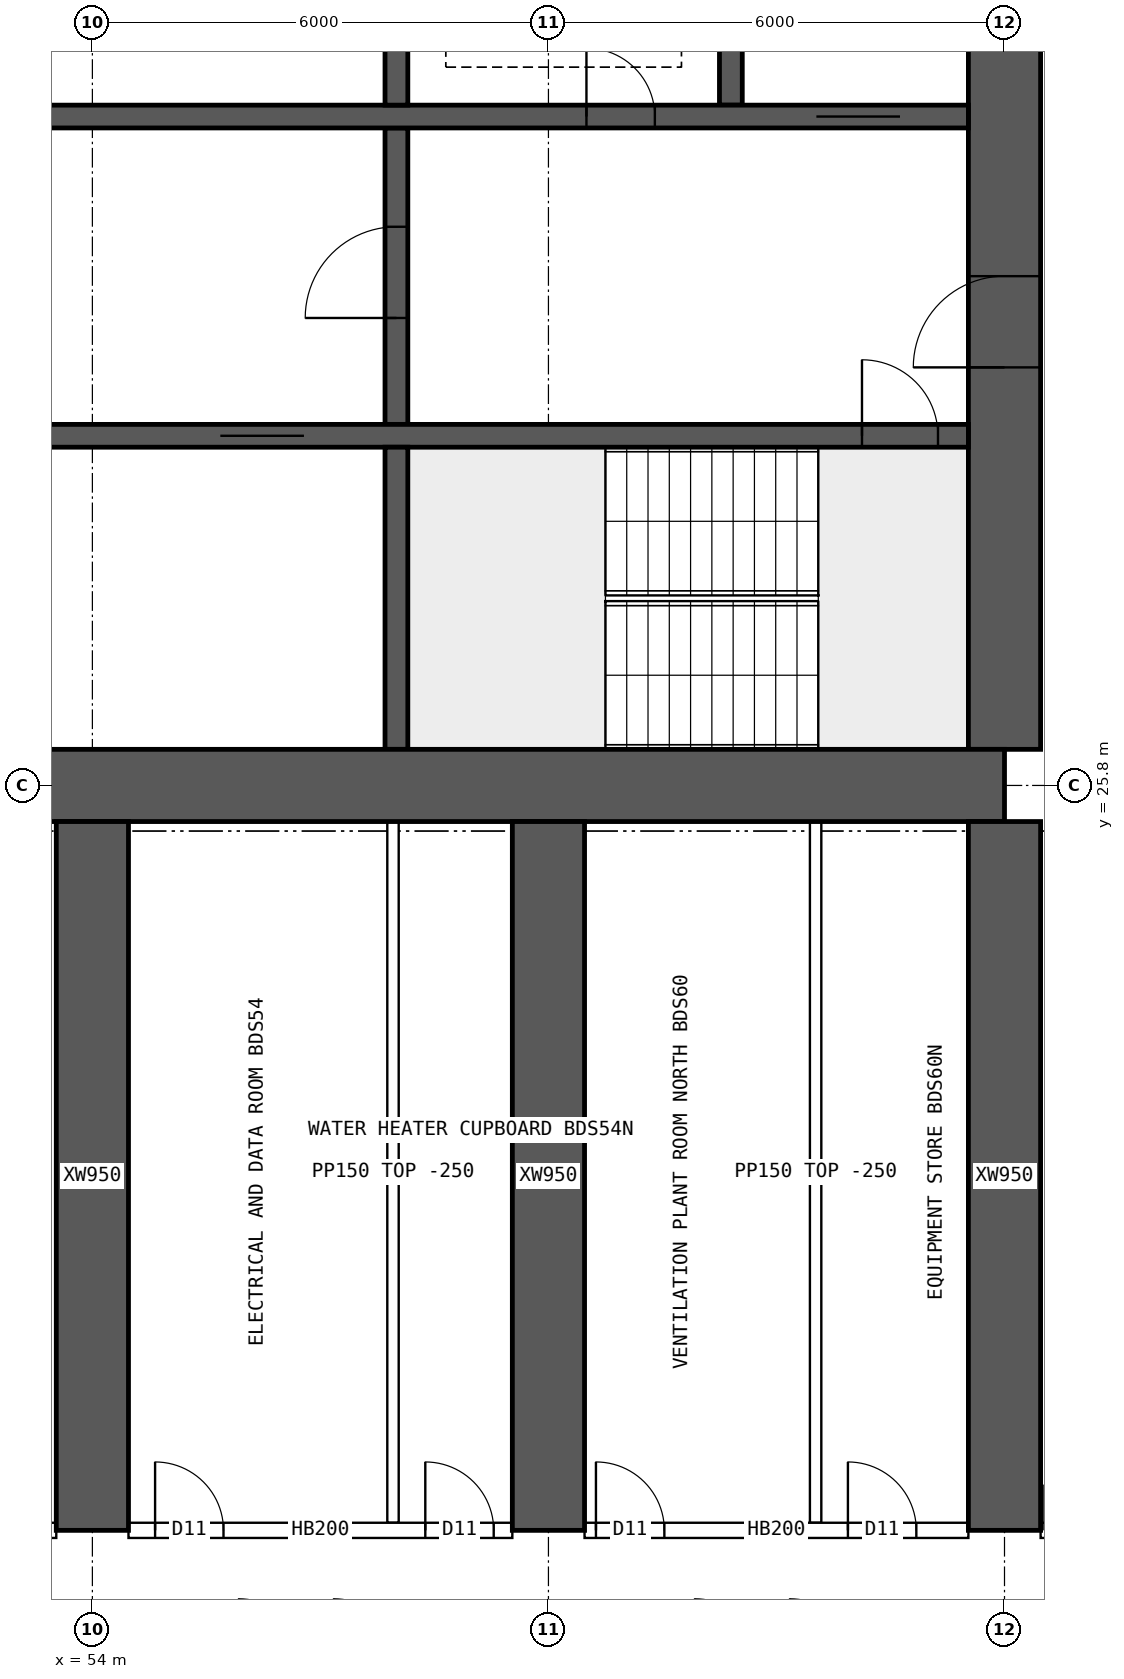
"""IFC4 building model, lengths in metres.
Left out: names, types, materials, properties, quantities, classifications, styles, units other than length and angle.
Written with IfcOpenShell. Run it as: python <this file> out.ifc"""

import sys

from ifc_helpers import new_model, si_unit, direction, frame, frame_2d, origin, place, context, subcontext, project, spatial, rectangle, extrude, element, fill, save


model = new_model("IFC4")
c1 = context("Model", 3, precision=1e-05, world=origin(), true_north=direction((0.0, 1.0)))
c2 = subcontext(c1, "Body", "Model", "MODEL_VIEW")
j1 = project(units=[si_unit("LENGTHUNIT", "METRE"), si_unit("PLANEANGLEUNIT", "RADIAN")], contexts=[c1])
p1 = place(None, origin())
s1 = spatial("IfcSite", under=j1, at=p1, CompositionType="ELEMENT")
p2 = place(p1, origin())
s2 = spatial("IfcBuilding", under=s1, at=p2, CompositionType="ELEMENT")
p3 = place(p2, frame((0.0, 0.0, 84.4)))
s3 = spatial("IfcBuildingStorey", under=s2, at=p3, CompositionType="ELEMENT", Elevation=84.4)
p4 = place(p3, frame((18.0, 25.8, 0.0), z_axis=(0.0, 0.0, 1.0), x_axis=(1.0, 0.0, 0.0)))
e1 = element("IfcWall", 1, at=p4, inside=s3, PredefinedType="SHEAR", context=c2, shape_type="SweptSolid", body=[
    extrude(rectangle(XDim=48.0, YDim=0.95, at=frame_2d((24.0, 0.0))), origin(), (0.0, 0.0, 1.0), 3.75),
])
p5 = place(p3, frame((66.0, 26.275, 0.0), z_axis=(0.0, 0.0, 1.0), x_axis=(0.0, 1.0, 0.0)))
e2 = element("IfcWall", 2, at=p5, inside=s3, PredefinedType="SHEAR", context=c2, shape_type="SweptSolid", body=[
    extrude(rectangle(XDim=11.45, YDim=0.95, at=frame_2d((5.725, 0.0))), origin(), (0.0, 0.0, 1.0), 3.75),
])
p6 = place(p5, frame((5.025, 0.0, 0.0)))
e3 = element("IfcOpeningElement", 3, at=p6, cuts=e2, PredefinedType="OPENING", context=c2, shape_type="SweptSolid", body=[
    extrude(rectangle(XDim=1.2, YDim=2.1, at=frame_2d((0.6, 1.05))), frame((0.0, 0.485, 0.0), z_axis=(0.0, -1.0, 0.0), x_axis=(1.0, 0.0, 0.0)), (0.0, 0.0, 1.0), 0.97),
])
p7 = place(p3, frame((18.475, 30.4, 0.0), z_axis=(0.0, 0.0, 1.0), x_axis=(1.0, 0.0, 0.0)))
e4 = element("IfcWall", 4, at=p7, inside=s3, PredefinedType="SHEAR", context=c2, shape_type="SweptSolid", body=[
    extrude(rectangle(XDim=47.05, YDim=0.3, at=frame_2d((23.525, 0.0))), origin(), (0.0, 0.0, 1.0), 3.75),
])
p8 = place(p7, frame((0.4, 0.0, 0.0)))
e5 = element("IfcOpeningElement", 5, at=p8, cuts=e4, PredefinedType="OPENING", context=c2, shape_type="SweptSolid", body=[
    extrude(rectangle(XDim=1.0, YDim=2.1, at=frame_2d((0.5, 1.05))), frame((0.0, 0.16, 0.0), z_axis=(0.0, -1.0, 0.0), x_axis=(1.0, 0.0, 0.0)), (0.0, 0.0, 1.0), 0.32),
])
p9 = place(p7, frame((45.65, 0.0, 0.0)))
e6 = element("IfcOpeningElement", 6, at=p9, cuts=e4, PredefinedType="OPENING", context=c2, shape_type="SweptSolid", body=[
    extrude(rectangle(XDim=1.0, YDim=2.1, at=frame_2d((0.5, 1.05))), frame((0.0, 0.16, 0.0), z_axis=(0.0, -1.0, 0.0), x_axis=(1.0, 0.0, 0.0)), (0.0, 0.0, 1.0), 0.32),
])
p10 = place(p7, frame((8.275, 0.0, 0.0)))
e7 = element("IfcOpeningElement", 7, at=p10, cuts=e4, PredefinedType="OPENING", context=c2, shape_type="SweptSolid", body=[
    extrude(rectangle(XDim=1.1, YDim=2.1, at=frame_2d((0.55, 1.05))), frame((0.0, 0.16, 0.0), z_axis=(0.0, -1.0, 0.0), x_axis=(1.0, 0.0, 0.0)), (0.0, 0.0, 1.0), 0.32),
])
p11 = place(p7, frame((10.875, 0.0, 0.0)))
e8 = element("IfcOpeningElement", 8, at=p11, cuts=e4, PredefinedType="OPENING", context=c2, shape_type="SweptSolid", body=[
    extrude(rectangle(XDim=1.1, YDim=2.1, at=frame_2d((0.55, 1.05))), frame((0.0, 0.16, 0.0), z_axis=(0.0, -1.0, 0.0), x_axis=(1.0, 0.0, 0.0)), (0.0, 0.0, 1.0), 0.32),
])
p12 = place(p7, frame((13.475, 0.0, 0.0)))
e9 = element("IfcOpeningElement", 9, at=p12, cuts=e4, PredefinedType="OPENING", context=c2, shape_type="SweptSolid", body=[
    extrude(rectangle(XDim=1.1, YDim=2.1, at=frame_2d((0.55, 1.05))), frame((0.0, 0.16, 0.0), z_axis=(0.0, -1.0, 0.0), x_axis=(1.0, 0.0, 0.0)), (0.0, 0.0, 1.0), 0.32),
])
p13 = place(p7, frame((16.075, 0.0, 0.0)))
e10 = element("IfcOpeningElement", 10, at=p13, cuts=e4, PredefinedType="OPENING", context=c2, shape_type="SweptSolid", body=[
    extrude(rectangle(XDim=1.1, YDim=2.1, at=frame_2d((0.55, 1.05))), frame((0.0, 0.16, 0.0), z_axis=(0.0, -1.0, 0.0), x_axis=(1.0, 0.0, 0.0)), (0.0, 0.0, 1.0), 0.32),
])
p14 = place(p7, frame((18.85, 0.0, 0.0)))
e11 = element("IfcOpeningElement", 11, at=p14, cuts=e4, PredefinedType="OPENING", context=c2, shape_type="SweptSolid", body=[
    extrude(rectangle(XDim=0.9, YDim=2.1, at=frame_2d((0.45, 1.05))), frame((0.0, 0.16, 0.0), z_axis=(0.0, -1.0, 0.0), x_axis=(1.0, 0.0, 0.0)), (0.0, 0.0, 1.0), 0.32),
])
p15 = place(p7, frame((30.142, 0.0, 0.0)))
e12 = element("IfcOpeningElement", 12, at=p15, cuts=e4, PredefinedType="OPENING", context=c2, shape_type="SweptSolid", body=[
    extrude(rectangle(XDim=1.1, YDim=2.1, at=frame_2d((0.55, 1.05))), frame((0.0, 0.16, 0.0), z_axis=(0.0, -1.0, 0.0), x_axis=(1.0, 0.0, 0.0)), (0.0, 0.0, 1.0), 0.32),
])
p16 = place(p7, frame((33.675, 0.0, 0.0)))
e13 = element("IfcOpeningElement", 13, at=p16, cuts=e4, PredefinedType="OPENING", context=c2, shape_type="SweptSolid", body=[
    extrude(rectangle(XDim=1.1, YDim=2.1, at=frame_2d((0.55, 1.05))), frame((0.0, 0.16, 0.0), z_axis=(0.0, -1.0, 0.0), x_axis=(1.0, 0.0, 0.0)), (0.0, 0.0, 1.0), 0.32),
])
p17 = place(p7, frame((37.208, 0.0, 0.0)))
e14 = element("IfcOpeningElement", 14, at=p17, cuts=e4, PredefinedType="OPENING", context=c2, shape_type="SweptSolid", body=[
    extrude(rectangle(XDim=1.1, YDim=2.1, at=frame_2d((0.55, 1.05))), frame((0.0, 0.16, 0.0), z_axis=(0.0, -1.0, 0.0), x_axis=(1.0, 0.0, 0.0)), (0.0, 0.0, 1.0), 0.32),
])
p18 = place(p3, frame((18.475, 34.6, 0.0), z_axis=(0.0, 0.0, 1.0), x_axis=(1.0, 0.0, 0.0)))
e15 = element("IfcWall", 15, at=p18, inside=s3, PredefinedType="SHEAR", context=c2, shape_type="SweptSolid", body=[
    extrude(rectangle(XDim=47.05, YDim=0.3, at=frame_2d((23.525, 0.0))), origin(), (0.0, 0.0, 1.0), 3.75),
])
p19 = place(p18, frame((0.9, 0.0, 0.0)))
e16 = element("IfcOpeningElement", 16, at=p19, cuts=e15, PredefinedType="OPENING", context=c2, shape_type="SweptSolid", body=[
    extrude(rectangle(XDim=1.1, YDim=2.1, at=frame_2d((0.55, 1.05))), frame((0.0, 0.16, 0.0), z_axis=(0.0, -1.0, 0.0), x_axis=(1.0, 0.0, 0.0)), (0.0, 0.0, 1.0), 0.32),
])
p20 = place(p18, frame((45.05, 0.0, 0.0)))
e17 = element("IfcOpeningElement", 17, at=p20, cuts=e15, PredefinedType="OPENING", context=c2, shape_type="SweptSolid", body=[
    extrude(rectangle(XDim=1.1, YDim=2.1, at=frame_2d((0.55, 1.05))), frame((0.0, 0.16, 0.0), z_axis=(0.0, -1.0, 0.0), x_axis=(1.0, 0.0, 0.0)), (0.0, 0.0, 1.0), 0.32),
])
p21 = place(p18, frame((4.125, 0.0, 0.0)))
e18 = element("IfcOpeningElement", 18, at=p21, cuts=e15, PredefinedType="OPENING", context=c2, shape_type="SweptSolid", body=[
    extrude(rectangle(XDim=0.9, YDim=2.1, at=frame_2d((0.45, 1.05))), frame((0.0, 0.16, 0.0), z_axis=(0.0, -1.0, 0.0), x_axis=(1.0, 0.0, 0.0)), (0.0, 0.0, 1.0), 0.32),
])
p22 = place(p18, frame((42.025, 0.0, 0.0)))
e19 = element("IfcOpeningElement", 19, at=p22, cuts=e15, PredefinedType="OPENING", context=c2, shape_type="SweptSolid", body=[
    extrude(rectangle(XDim=0.9, YDim=2.1, at=frame_2d((0.45, 1.05))), frame((0.0, 0.16, 0.0), z_axis=(0.0, -1.0, 0.0), x_axis=(1.0, 0.0, 0.0)), (0.0, 0.0, 1.0), 0.32),
])
p23 = place(p18, frame((8.9, 0.0, 0.0)))
e20 = element("IfcOpeningElement", 20, at=p23, cuts=e15, PredefinedType="OPENING", context=c2, shape_type="SweptSolid", body=[
    extrude(rectangle(XDim=0.9, YDim=2.1, at=frame_2d((0.45, 1.05))), frame((0.0, 0.16, 0.0), z_axis=(0.0, -1.0, 0.0), x_axis=(1.0, 0.0, 0.0)), (0.0, 0.0, 1.0), 0.32),
])
p24 = place(p18, frame((12.874, 0.0, 0.0)))
e21 = element("IfcOpeningElement", 21, at=p24, cuts=e15, PredefinedType="OPENING", context=c2, shape_type="SweptSolid", body=[
    extrude(rectangle(XDim=0.9, YDim=2.1, at=frame_2d((0.45, 1.05))), frame((0.0, 0.16, 0.0), z_axis=(0.0, -1.0, 0.0), x_axis=(1.0, 0.0, 0.0)), (0.0, 0.0, 1.0), 0.32),
])
p25 = place(p18, frame((16.521, 0.0, 0.0)))
e22 = element("IfcOpeningElement", 22, at=p25, cuts=e15, PredefinedType="OPENING", context=c2, shape_type="SweptSolid", body=[
    extrude(rectangle(XDim=0.9, YDim=2.1, at=frame_2d((0.45, 1.05))), frame((0.0, 0.16, 0.0), z_axis=(0.0, -1.0, 0.0), x_axis=(1.0, 0.0, 0.0)), (0.0, 0.0, 1.0), 0.32),
])
p26 = place(p18, frame((20.28, 0.0, 0.0)))
e23 = element("IfcOpeningElement", 23, at=p26, cuts=e15, PredefinedType="OPENING", context=c2, shape_type="SweptSolid", body=[
    extrude(rectangle(XDim=0.9, YDim=2.1, at=frame_2d((0.45, 1.05))), frame((0.0, 0.16, 0.0), z_axis=(0.0, -1.0, 0.0), x_axis=(1.0, 0.0, 0.0)), (0.0, 0.0, 1.0), 0.32),
])
p27 = place(p18, frame((24.686, 0.0, 0.0)))
e24 = element("IfcOpeningElement", 24, at=p27, cuts=e15, PredefinedType="OPENING", context=c2, shape_type="SweptSolid", body=[
    extrude(rectangle(XDim=0.9, YDim=2.1, at=frame_2d((0.45, 1.05))), frame((0.0, 0.16, 0.0), z_axis=(0.0, -1.0, 0.0), x_axis=(1.0, 0.0, 0.0)), (0.0, 0.0, 1.0), 0.32),
])
p28 = place(p18, frame((27.483, 0.0, 0.0)))
e25 = element("IfcOpeningElement", 25, at=p28, cuts=e15, PredefinedType="OPENING", context=c2, shape_type="SweptSolid", body=[
    extrude(rectangle(XDim=0.9, YDim=2.1, at=frame_2d((0.45, 1.05))), frame((0.0, 0.16, 0.0), z_axis=(0.0, -1.0, 0.0), x_axis=(1.0, 0.0, 0.0)), (0.0, 0.0, 1.0), 0.32),
])
p29 = place(p18, frame((33.604, 0.0, 0.0)))
e26 = element("IfcOpeningElement", 26, at=p29, cuts=e15, PredefinedType="OPENING", context=c2, shape_type="SweptSolid", body=[
    extrude(rectangle(XDim=0.9, YDim=2.1, at=frame_2d((0.45, 1.05))), frame((0.0, 0.16, 0.0), z_axis=(0.0, -1.0, 0.0), x_axis=(1.0, 0.0, 0.0)), (0.0, 0.0, 1.0), 0.32),
])
p30 = place(p3, frame((58.0, 26.275, 0.0), z_axis=(0.0, 0.0, 1.0), x_axis=(0.0, 1.0, 0.0)))
e27 = element("IfcWall", 27, at=p30, inside=s3, PredefinedType="SHEAR", context=c2, shape_type="SweptSolid", body=[
    extrude(rectangle(XDim=3.975, YDim=0.3, at=frame_2d((1.988, 0.0))), origin(), (0.0, 0.0, 1.0), 3.75),
])
p31 = place(p3, frame((58.0, 30.55, 0.0), z_axis=(0.0, 0.0, 1.0), x_axis=(0.0, 1.0, 0.0)))
e28 = element("IfcWall", 28, at=p31, inside=s3, PredefinedType="SHEAR", context=c2, shape_type="SweptSolid", body=[
    extrude(rectangle(XDim=3.9, YDim=0.3, at=frame_2d((1.95, 0.0))), origin(), (0.0, 0.0, 1.0), 3.75),
])
p32 = place(p31, frame((1.4, 0.0, 0.0)))
e29 = element("IfcOpeningElement", 29, at=p32, cuts=e28, PredefinedType="OPENING", context=c2, shape_type="SweptSolid", body=[
    extrude(rectangle(XDim=1.2, YDim=2.1, at=frame_2d((0.6, 1.05))), frame((0.0, 0.16, 0.0), z_axis=(0.0, -1.0, 0.0), x_axis=(1.0, 0.0, 0.0)), (0.0, 0.0, 1.0), 0.32),
])
for number, where, z_axis, x_axis in (
    (30, (62.4, 34.75, 0.0), (0.0, 0.0, 1.0), (0.0, 1.0, 0.0)),
    (31, (58.0, 34.75, 0.0), (0.0, 0.0, 1.0), (0.0, 1.0, 0.0)),
):
    element("IfcWall", number, at=place(p3, frame(where, z_axis=z_axis, x_axis=x_axis)), inside=s3, PredefinedType="SHEAR", context=c2, shape_type="SweptSolid", body=[
        extrude(rectangle(XDim=2.975, YDim=0.3, at=frame_2d((1.488, 0.0))), origin(), (0.0, 0.0, 1.0), 3.75),
    ])
for number, where, z_axis, x_axis in (
    (32, (54.0, 16.0, 0.0), (0.0, 0.0, 1.0), (0.0, 1.0, 0.0)),
    (33, (60.0, 16.0, 0.0), (0.0, 0.0, 1.0), (0.0, 1.0, 0.0)),
    (34, (66.0, 16.0, 0.0), (0.0, 0.0, 1.0), (0.0, 1.0, 0.0)),
):
    element("IfcWall", number, at=place(p3, frame(where, z_axis=z_axis, x_axis=x_axis)), inside=s3, PredefinedType="SHEAR", context=c2, shape_type="SweptSolid", body=[
        extrude(rectangle(XDim=9.325, YDim=0.95, at=frame_2d((4.663, 0.0))), origin(), (0.0, 0.0, 1.0), 3.75),
    ])
p33 = place(p3, frame((48.475, 16.0, 0.0), z_axis=(0.0, 0.0, 1.0), x_axis=(1.0, 0.0, 0.0)))
e35 = element("IfcWall", 35, at=p33, inside=s3, PredefinedType="SOLIDWALL", context=c2, shape_type="SweptSolid", body=[
    extrude(rectangle(XDim=5.05, YDim=0.2, at=frame_2d((2.525, 0.0))), origin(), (0.0, 0.0, 1.0), 3.5),
])
p34 = place(p33, frame((0.4, 0.0, 0.0)))
e36 = element("IfcOpeningElement", 36, at=p34, cuts=e35, PredefinedType="OPENING", context=c2, shape_type="SweptSolid", body=[
    extrude(rectangle(XDim=1.0, YDim=2.1, at=frame_2d((0.5, 1.05))), frame((0.0, 0.11, 0.0), z_axis=(0.0, -1.0, 0.0), x_axis=(1.0, 0.0, 0.0)), (0.0, 0.0, 1.0), 0.22),
])
p35 = place(p3, frame((54.475, 16.0, 0.0), z_axis=(0.0, 0.0, 1.0), x_axis=(1.0, 0.0, 0.0)))
e37 = element("IfcWall", 37, at=p35, inside=s3, PredefinedType="SOLIDWALL", context=c2, shape_type="SweptSolid", body=[
    extrude(rectangle(XDim=5.05, YDim=0.2, at=frame_2d((2.525, 0.0))), origin(), (0.0, 0.0, 1.0), 3.5),
])
p36 = place(p35, frame((0.35, 0.0, 0.0)))
e38 = element("IfcOpeningElement", 38, at=p36, cuts=e37, PredefinedType="OPENING", context=c2, shape_type="SweptSolid", body=[
    extrude(rectangle(XDim=0.9, YDim=2.1, at=frame_2d((0.45, 1.05))), frame((0.0, 0.11, 0.0), z_axis=(0.0, -1.0, 0.0), x_axis=(1.0, 0.0, 0.0)), (0.0, 0.0, 1.0), 0.22),
])
p37 = place(p35, frame((3.905, 0.0, 0.0)))
e39 = element("IfcOpeningElement", 39, at=p37, cuts=e37, PredefinedType="OPENING", context=c2, shape_type="SweptSolid", body=[
    extrude(rectangle(XDim=0.9, YDim=2.1, at=frame_2d((0.45, 1.05))), frame((0.0, 0.11, 0.0), z_axis=(0.0, -1.0, 0.0), x_axis=(1.0, 0.0, 0.0)), (0.0, 0.0, 1.0), 0.22),
])
p38 = place(p3, frame((60.475, 16.0, 0.0), z_axis=(0.0, 0.0, 1.0), x_axis=(1.0, 0.0, 0.0)))
e40 = element("IfcWall", 40, at=p38, inside=s3, PredefinedType="SOLIDWALL", context=c2, shape_type="SweptSolid", body=[
    extrude(rectangle(XDim=5.05, YDim=0.2, at=frame_2d((2.525, 0.0))), origin(), (0.0, 0.0, 1.0), 3.5),
])
p39 = place(p38, frame((0.15, 0.0, 0.0)))
e41 = element("IfcOpeningElement", 41, at=p39, cuts=e40, PredefinedType="OPENING", context=c2, shape_type="SweptSolid", body=[
    extrude(rectangle(XDim=0.9, YDim=2.1, at=frame_2d((0.45, 1.05))), frame((0.0, 0.11, 0.0), z_axis=(0.0, -1.0, 0.0), x_axis=(1.0, 0.0, 0.0)), (0.0, 0.0, 1.0), 0.22),
])
p40 = place(p38, frame((3.465, 0.0, 0.0)))
e42 = element("IfcOpeningElement", 42, at=p40, cuts=e40, PredefinedType="OPENING", context=c2, shape_type="SweptSolid", body=[
    extrude(rectangle(XDim=0.9, YDim=2.1, at=frame_2d((0.45, 1.05))), frame((0.0, 0.11, 0.0), z_axis=(0.0, -1.0, 0.0), x_axis=(1.0, 0.0, 0.0)), (0.0, 0.0, 1.0), 0.22),
])
p41 = place(p3, frame((66.475, 16.0, 0.0), z_axis=(0.0, 0.0, 1.0), x_axis=(1.0, 0.0, 0.0)))
e43 = element("IfcWall", 43, at=p41, inside=s3, PredefinedType="SOLIDWALL", context=c2, shape_type="SweptSolid", body=[
    extrude(rectangle(XDim=1.925, YDim=0.2, at=frame_2d((0.962, 0.0))), origin(), (0.0, 0.0, 1.0), 3.5),
])
p42 = place(p41, frame((0.05, 0.0, 0.0)))
e44 = element("IfcOpeningElement", 44, at=p42, cuts=e43, PredefinedType="OPENING", context=c2, shape_type="SweptSolid", body=[
    extrude(rectangle(XDim=1.2, YDim=2.1, at=frame_2d((0.6, 1.05))), frame((0.0, 0.11, 0.0), z_axis=(0.0, -1.0, 0.0), x_axis=(1.0, 0.0, 0.0)), (0.0, 0.0, 1.0), 0.22),
])
for number, where, z_axis, x_axis in (
    (45, (57.955, 16.1, 0.0), (0.0, 0.0, 1.0), (0.0, 1.0, 0.0)),
    (46, (63.515, 16.1, 0.0), (0.0, 0.0, 1.0), (0.0, 1.0, 0.0)),
):
    element("IfcWall", number, at=place(p3, frame(where, z_axis=z_axis, x_axis=x_axis)), inside=s3, PredefinedType="PARTITIONING", context=c2, shape_type="SweptSolid", body=[
        extrude(rectangle(XDim=9.225, YDim=0.15, at=frame_2d((4.612, 0.0))), origin(), (0.0, 0.0, 1.0), 3.5),
    ])
p43 = place(p6, origin())
e47 = element("IfcDoor", 47, at=p43, inside=s3, OperationType="SINGLE_SWING_LEFT", PredefinedType="DOOR", context=c2, shape_type="SweptSolid", body=[
    extrude(rectangle(XDim=1.2, YDim=2.1, at=frame_2d((0.6, 1.05))), frame((0.0, 0.025, 0.0), z_axis=(0.0, -1.0, 0.0), x_axis=(1.0, 0.0, 0.0)), (0.0, 0.0, 1.0), 0.05),
])
fill(e3, e47)
p44 = place(p9, origin())
e48 = element("IfcDoor", 48, at=p44, inside=s3, OperationType="SINGLE_SWING_LEFT", PredefinedType="DOOR", context=c2, shape_type="SweptSolid", body=[
    extrude(rectangle(XDim=1.0, YDim=2.1, at=frame_2d((0.5, 1.05))), frame((0.0, 0.025, 0.0), z_axis=(0.0, -1.0, 0.0), x_axis=(1.0, 0.0, 0.0)), (0.0, 0.0, 1.0), 0.05),
])
fill(e6, e48)
p45 = place(p20, origin())
e49 = element("IfcDoor", 49, at=p45, inside=s3, OperationType="DOUBLE_DOOR_SLIDING", PredefinedType="DOOR", context=c2, shape_type="SweptSolid", body=[
    extrude(rectangle(XDim=1.1, YDim=2.1, at=frame_2d((0.55, 1.05))), frame((0.0, 0.025, 0.0), z_axis=(0.0, -1.0, 0.0), x_axis=(1.0, 0.0, 0.0)), (0.0, 0.0, 1.0), 0.05),
])
fill(e17, e49)
p46 = place(p22, origin())
e50 = element("IfcDoor", 50, at=p46, inside=s3, OperationType="SINGLE_SWING_LEFT", PredefinedType="DOOR", context=c2, shape_type="SweptSolid", body=[
    extrude(rectangle(XDim=0.9, YDim=2.1, at=frame_2d((0.45, 1.05))), frame((0.0, 0.025, 0.0), z_axis=(0.0, -1.0, 0.0), x_axis=(1.0, 0.0, 0.0)), (0.0, 0.0, 1.0), 0.05),
])
fill(e19, e50)
p47 = place(p32, origin())
e51 = element("IfcDoor", 51, at=p47, inside=s3, OperationType="SINGLE_SWING_LEFT", PredefinedType="DOOR", context=c2, shape_type="SweptSolid", body=[
    extrude(rectangle(XDim=1.2, YDim=2.1, at=frame_2d((0.6, 1.05))), frame((0.0, 0.025, 0.0), z_axis=(0.0, -1.0, 0.0), x_axis=(1.0, 0.0, 0.0)), (0.0, 0.0, 1.0), 0.05),
])
fill(e29, e51)
p48 = place(p17, origin())
e52 = element("IfcDoor", 52, at=p48, inside=s3, OperationType="DOUBLE_DOOR_SLIDING", PredefinedType="DOOR", context=c2, shape_type="SweptSolid", body=[
    extrude(rectangle(XDim=1.1, YDim=2.1, at=frame_2d((0.55, 1.05))), frame((0.0, 0.025, 0.0), z_axis=(0.0, -1.0, 0.0), x_axis=(1.0, 0.0, 0.0)), (0.0, 0.0, 1.0), 0.05),
])
fill(e14, e52)
p49 = place(p36, origin())
e53 = element("IfcDoor", 53, at=p49, inside=s3, OperationType="SINGLE_SWING_LEFT", PredefinedType="DOOR", context=c2, shape_type="SweptSolid", body=[
    extrude(rectangle(XDim=0.9, YDim=2.1, at=frame_2d((0.45, 1.05))), frame((0.0, 0.025, 0.0), z_axis=(0.0, -1.0, 0.0), x_axis=(1.0, 0.0, 0.0)), (0.0, 0.0, 1.0), 0.05),
])
fill(e38, e53)
p50 = place(p37, origin())
e54 = element("IfcDoor", 54, at=p50, inside=s3, OperationType="SINGLE_SWING_LEFT", PredefinedType="DOOR", context=c2, shape_type="SweptSolid", body=[
    extrude(rectangle(XDim=0.9, YDim=2.1, at=frame_2d((0.45, 1.05))), frame((0.0, 0.025, 0.0), z_axis=(0.0, -1.0, 0.0), x_axis=(1.0, 0.0, 0.0)), (0.0, 0.0, 1.0), 0.05),
])
fill(e39, e54)
p51 = place(p39, origin())
e55 = element("IfcDoor", 55, at=p51, inside=s3, OperationType="SINGLE_SWING_LEFT", PredefinedType="DOOR", context=c2, shape_type="SweptSolid", body=[
    extrude(rectangle(XDim=0.9, YDim=2.1, at=frame_2d((0.45, 1.05))), frame((0.0, 0.025, 0.0), z_axis=(0.0, -1.0, 0.0), x_axis=(1.0, 0.0, 0.0)), (0.0, 0.0, 1.0), 0.05),
])
fill(e41, e55)
p52 = place(p40, origin())
e56 = element("IfcDoor", 56, at=p52, inside=s3, OperationType="SINGLE_SWING_LEFT", PredefinedType="DOOR", context=c2, shape_type="SweptSolid", body=[
    extrude(rectangle(XDim=0.9, YDim=2.1, at=frame_2d((0.45, 1.05))), frame((0.0, 0.025, 0.0), z_axis=(0.0, -1.0, 0.0), x_axis=(1.0, 0.0, 0.0)), (0.0, 0.0, 1.0), 0.05),
])
fill(e42, e56)
save(model, sys.argv[1])
